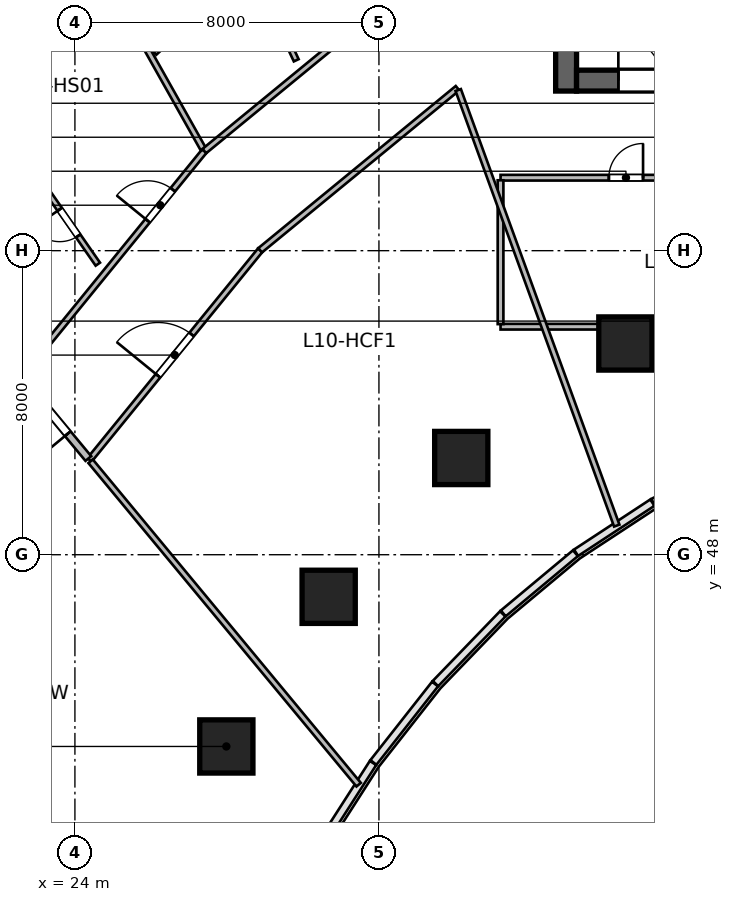
"""IFC4 building model, lengths in metres.
Left out: names, types, materials, properties, quantities, classifications, styles, units other than length and angle.
Written with IfcOpenShell. Run it as: python <this file> out.ifc"""

import sys

from ifc_helpers import new_model, si_unit, direction, frame, frame_2d, origin, origin_2d, place, context, subcontext, project, spatial, rectangle, circle, extrude, source, transform, mapped, element, fill, save


model = new_model("IFC4")
c1 = context("Model", 3, precision=1e-05, world=origin(), true_north=direction((0.0, 1.0)))
c2 = subcontext(c1, "Body", "Model", "MODEL_VIEW")
j1 = project(units=[si_unit("LENGTHUNIT", "METRE"), si_unit("PLANEANGLEUNIT", "RADIAN")], contexts=[c1])
p1 = place(None, origin())
s1 = spatial("IfcSite", under=j1, at=p1, CompositionType="ELEMENT")
p2 = place(p1, origin())
s2 = spatial("IfcBuilding", under=s1, at=p2, CompositionType="ELEMENT")
p3 = place(p2, frame((0.0, 0.0, 49.8)))
s3 = spatial("IfcBuildingStorey", under=s2, at=p3, CompositionType="ELEMENT", Elevation=49.8)
m1 = source(origin(), c2, "Body", "SweptSolid", [
    extrude(rectangle(XDim=12.0, YDim=0.55, at=frame_2d((6.0, 0.0))), origin(), (0.0, 0.0, 1.0), 3.6),
])
p4 = place(p3, frame((36.925, 60.2, 0.0), z_axis=(0.0, 0.0, 1.0), x_axis=(0.0, 1.0, 0.0)))
e1 = element("IfcWall", 1, at=p4, inside=s3, PredefinedType="SHEAR", context=c2, shape_type="MappedRepresentation", body=[
    mapped(m1, transform((0.0, 0.0, 0.0), scale=1.0)),
])
m2 = source(origin(), c2, "Body", "SweptSolid", [
    extrude(rectangle(XDim=21.6, YDim=0.55, at=frame_2d((10.8, 0.0))), origin(), (0.0, 0.0, 1.0), 3.6),
])
p5 = place(p3, frame((37.2, 60.475, 0.0), z_axis=(0.0, 0.0, 1.0), x_axis=(1.0, 0.0, 0.0)))
e2 = element("IfcWall", 2, at=p5, inside=s3, PredefinedType="SHEAR", context=c2, shape_type="MappedRepresentation", body=[
    mapped(m2, transform((0.0, 0.0, 0.0), scale=1.0)),
])
p6 = place(p5, frame((1.1, 0.0, 0.0)))
e3 = element("IfcOpeningElement", 3, at=p6, cuts=e2, PredefinedType="OPENING", context=c2, shape_type="SweptSolid", body=[
    extrude(rectangle(XDim=1.15, YDim=2.15, at=frame_2d((0.575, 1.075))), frame((0.0, 0.285, 0.0), z_axis=(0.0, -1.0, 0.0), x_axis=(1.0, 0.0, 0.0)), (0.0, 0.0, 1.0), 0.57),
])
p7 = place(p5, frame((19.5, 0.0, 0.0)))
e4 = element("IfcOpeningElement", 4, at=p7, cuts=e2, PredefinedType="OPENING", context=c2, shape_type="SweptSolid", body=[
    extrude(rectangle(XDim=0.9, YDim=2.1, at=frame_2d((0.45, 1.05))), frame((0.0, 0.285, 0.0), z_axis=(0.0, -1.0, 0.0), x_axis=(1.0, 0.0, 0.0)), (0.0, 0.0, 1.0), 0.57),
])
p8 = place(p5, frame((12.02, 0.0, 0.0)))
e5 = element("IfcOpeningElement", 5, at=p8, cuts=e2, PredefinedType="OPENING", context=c2, shape_type="SweptSolid", body=[
    extrude(rectangle(XDim=1.6, YDim=2.15, at=frame_2d((0.8, 1.075))), frame((0.0, 0.285, 0.0), z_axis=(0.0, -1.0, 0.0), x_axis=(1.0, 0.0, 0.0)), (0.0, 0.0, 1.0), 0.57),
])
m3 = source(origin(), c2, "Body", "SweptSolid", [
    extrude(circle(Radius=0.7, at=origin_2d()), origin(), (0.0, 0.0, 1.0), 3.6),
])
for number, where, z_axis, x_axis in (
    (6, (27.985, 42.955, 0.0), (0.0, 0.0, 1.0), (-0.691, 0.723, 0.0)),
    (7, (30.677, 46.892, 0.0), (0.0, 0.0, 1.0), (-0.571, 0.821, 0.0)),
    (8, (34.166, 50.545, 0.0), (0.0, 0.0, 1.0), (-0.436, 0.9, 0.0)),
    (9, (38.485, 53.558, 0.0), (0.0, 0.0, 1.0), (-0.289, 0.957, 0.0)),
):
    element("IfcColumn", number, at=place(p3, frame(where, z_axis=z_axis, x_axis=x_axis)), inside=s3, PredefinedType="COLUMN", context=c2, shape_type="MappedRepresentation", body=[
        mapped(m3, transform((0.0, 0.0, 0.0), scale=1.0)),
    ])
m4 = source(origin(), c2, "Body", "SweptSolid", [
    extrude(rectangle(XDim=6.6, YDim=0.15, at=frame_2d((3.3, 0.0))), origin(), (0.0, 0.0, 1.0), 2.803),
])
p9 = place(p3, frame((35.2, 54.0, 0.0), z_axis=(0.0, 0.0, 1.0), x_axis=(1.0, 0.0, 0.0)))
e10 = element("IfcWall", 10, at=p9, inside=s3, PredefinedType="PARTITIONING", context=c2, shape_type="MappedRepresentation", body=[
    mapped(m4, transform((0.0, 0.0, 0.0), scale=1.0)),
])
m5 = source(origin(), c2, "Body", "SweptSolid", [
    extrude(rectangle(XDim=6.6, YDim=0.15, at=frame_2d((3.3, 0.0))), origin(), (0.0, 0.0, 1.0), 3.36),
])
p10 = place(p3, frame((35.2, 57.92, 0.0), z_axis=(0.0, 0.0, 1.0), x_axis=(1.0, 0.0, 0.0)))
e11 = element("IfcWall", 11, at=p10, inside=s3, PredefinedType="PARTITIONING", context=c2, shape_type="MappedRepresentation", body=[
    mapped(m5, transform((0.0, 0.0, 0.0), scale=1.0)),
])
p11 = place(p10, frame((2.85, 0.0, 0.0)))
e12 = element("IfcOpeningElement", 12, at=p11, cuts=e11, PredefinedType="OPENING", context=c2, shape_type="SweptSolid", body=[
    extrude(rectangle(XDim=0.9, YDim=2.1, at=frame_2d((0.45, 1.05))), frame((0.0, 0.085, 0.0), z_axis=(0.0, -1.0, 0.0), x_axis=(1.0, 0.0, 0.0)), (0.0, 0.0, 1.0), 0.17),
])
m6 = source(origin(), c2, "Body", "SweptSolid", [
    extrude(rectangle(XDim=3.785, YDim=0.15, at=frame_2d((1.893, 0.0))), origin(), (0.0, 0.0, 1.0), 3.36),
])
p12 = place(p3, frame((35.2, 54.067, 0.0), z_axis=(0.0, 0.0, 1.0), x_axis=(0.0, 1.0, 0.0)))
e13 = element("IfcWall", 13, at=p12, inside=s3, PredefinedType="PARTITIONING", context=c2, shape_type="MappedRepresentation", body=[
    mapped(m6, transform((0.0, 0.0, 0.0), scale=1.0)),
])
m7 = source(origin(), c2, "Body", "SweptSolid", [
    extrude(rectangle(XDim=7.659, YDim=0.15, at=frame_2d((3.829, 0.0))), origin(), (0.0, 0.0, 1.0), 3.36),
])
p13 = place(p3, frame((22.57, 52.683, 0.0), z_axis=(0.0, 0.0, 1.0), x_axis=(0.631489868862, 0.775384127723, 0.0)))
e14 = element("IfcWall", 14, at=p13, inside=s3, PredefinedType="PARTITIONING", context=c2, shape_type="MappedRepresentation", body=[
    mapped(m7, transform((0.0, 0.0, 0.0), scale=1.0)),
])
p14 = place(p13, frame((5.295, 0.0, 0.0)))
e15 = element("IfcOpeningElement", 15, at=p14, cuts=e14, PredefinedType="OPENING", context=c2, shape_type="SweptSolid", body=[
    extrude(rectangle(XDim=1.05, YDim=2.15, at=frame_2d((0.525, 1.075))), frame((0.0, 0.085, 0.0), z_axis=(0.0, -1.0, 0.0), x_axis=(1.0, 0.0, 0.0)), (0.0, 0.0, 1.0), 0.17),
])
m8 = source(origin(), c2, "Body", "SweptSolid", [
    extrude(rectangle(XDim=11.573, YDim=0.15, at=frame_2d((5.786, 0.0))), origin(), (0.0, 0.0, 1.0), 3.36),
])
p15 = place(p3, frame((27.382, 58.664, 0.0), z_axis=(0.0, 0.0, 1.0), x_axis=(-0.490161073951, 0.871631872744, 0.0)))
e16 = element("IfcWall", 16, at=p15, inside=s3, PredefinedType="PARTITIONING", context=c2, shape_type="MappedRepresentation", body=[
    mapped(m8, transform((0.0, 0.0, 0.0), scale=1.0)),
])
m9 = source(origin(), c2, "Body", "SweptSolid", [
    extrude(rectangle(XDim=2.663, YDim=0.14, at=frame_2d((1.332, 0.0))), origin(), (0.0, 0.0, 1.0), 2.644),
])
p16 = place(p3, frame((24.603, 55.645, 0.0), z_axis=(0.0, 0.0, 1.0), x_axis=(-0.570905989724, 0.821015438891, 0.0)))
e17 = element("IfcWall", 17, at=p16, inside=s3, PredefinedType="PARTITIONING", context=c2, shape_type="MappedRepresentation", body=[
    mapped(m9, transform((0.0, 0.0, 0.0), scale=1.0)),
])
p17 = place(p16, frame((0.906, 0.0, 0.0)))
e18 = element("IfcOpeningElement", 18, at=p17, cuts=e17, PredefinedType="OPENING", context=c2, shape_type="SweptSolid", body=[
    extrude(rectangle(XDim=0.85, YDim=2.05, at=frame_2d((0.425, 1.025))), frame((0.0, 0.08, 0.0), z_axis=(0.0, -1.0, 0.0), x_axis=(1.0, 0.0, 0.0)), (0.0, 0.0, 1.0), 0.16),
])
m10 = source(origin(), c2, "Body", "SweptSolid", [
    extrude(rectangle(XDim=7.237, YDim=0.15, at=frame_2d((3.618, 0.0))), origin(), (0.0, 0.0, 1.0), 3.36),
])
p18 = place(p3, frame((27.406, 58.621, 0.0), z_axis=(0.0, 0.0, 1.0), x_axis=(0.772813707793, 0.634632943557, 0.0)))
e19 = element("IfcWall", 19, at=p18, inside=s3, PredefinedType="PARTITIONING", context=c2, shape_type="MappedRepresentation", body=[
    mapped(m10, transform((0.0, 0.0, 0.0), scale=1.0)),
])
p19 = place(p18, frame((4.975, 0.0, 0.0)))
e20 = element("IfcOpeningElement", 20, at=p19, cuts=e19, PredefinedType="OPENING", context=c2, shape_type="SweptSolid", body=[
    extrude(rectangle(XDim=1.05, YDim=2.15, at=frame_2d((0.525, 1.075))), frame((0.0, 0.085, 0.0), z_axis=(0.0, -1.0, 0.0), x_axis=(1.0, 0.0, 0.0)), (0.0, 0.0, 1.0), 0.17),
])
m11 = source(origin(), c2, "Body", "SweptSolid", [
    extrude(rectangle(XDim=3.456, YDim=0.14, at=frame_2d((1.728, 0.0))), origin(), (0.0, 0.0, 1.0), 3.36),
])
p20 = place(p3, frame((26.095, 61.207, 0.0), z_axis=(0.0, 0.0, 1.0), x_axis=(0.736860870293, 0.676044420013, 0.0)))
e21 = element("IfcWall", 21, at=p20, inside=s3, PredefinedType="PARTITIONING", context=c2, shape_type="MappedRepresentation", body=[
    mapped(m11, transform((0.0, 0.0, 0.0), scale=1.0)),
])
m12 = source(origin(), c2, "Body", "SweptSolid", [
    extrude(rectangle(XDim=2.796, YDim=0.14, at=frame_2d((1.398, 0.0))), origin(), (0.0, 0.0, 1.0), 3.36),
])
p21 = place(p3, frame((29.823, 61.009, 0.0), z_axis=(0.0, 0.0, 1.0), x_axis=(-0.422316594955, 0.906448395456, 0.0)))
e22 = element("IfcWall", 22, at=p21, inside=s3, PredefinedType="PARTITIONING", context=c2, shape_type="MappedRepresentation", body=[
    mapped(m12, transform((0.0, 0.0, 0.0), scale=1.0)),
])
p22 = place(p21, frame((0.973, 0.0, 0.0)))
e23 = element("IfcOpeningElement", 23, at=p22, cuts=e22, PredefinedType="OPENING", context=c2, shape_type="SweptSolid", body=[
    extrude(rectangle(XDim=0.85, YDim=2.05, at=frame_2d((0.425, 1.025))), frame((0.0, 0.08, 0.0), z_axis=(0.0, -1.0, 0.0), x_axis=(1.0, 0.0, 0.0)), (0.0, 0.0, 1.0), 0.16),
])
m13 = source(origin(), c2, "Body", "SweptSolid", [
    extrude(rectangle(XDim=7.113, YDim=0.15, at=frame_2d((3.556, 0.0))), origin(), (0.0, 0.0, 1.0), 3.36),
])
p23 = place(p3, frame((24.383, 50.495, 0.0), z_axis=(0.0, 0.0, 1.0), x_axis=(0.63149032532, 0.775383755974, 0.0)))
e24 = element("IfcWall", 24, at=p23, inside=s3, PredefinedType="PARTITIONING", context=c2, shape_type="MappedRepresentation", body=[
    mapped(m13, transform((0.0, 0.0, 0.0), scale=1.0)),
])
p24 = place(p23, frame((2.856, 0.0, 0.0)))
e25 = element("IfcOpeningElement", 25, at=p24, cuts=e24, PredefinedType="OPENING", context=c2, shape_type="SweptSolid", body=[
    extrude(rectangle(XDim=1.4, YDim=2.15, at=frame_2d((0.7, 1.075))), frame((0.0, 0.085, 0.0), z_axis=(0.0, -1.0, 0.0), x_axis=(1.0, 0.0, 0.0)), (0.0, 0.0, 1.0), 0.17),
])
m14 = source(origin(), c2, "Body", "SweptSolid", [
    extrude(rectangle(XDim=6.721, YDim=0.15, at=frame_2d((3.361, 0.0))), origin(), (0.0, 0.0, 1.0), 3.36),
])
p25 = place(p3, frame((28.874, 56.01, 0.0), z_axis=(0.0, 0.0, 1.0), x_axis=(0.772828051199, 0.63461547671, 0.0)))
e26 = element("IfcWall", 26, at=p25, inside=s3, PredefinedType="PARTITIONING", context=c2, shape_type="MappedRepresentation", body=[
    mapped(m14, transform((0.0, 0.0, 0.0), scale=1.0)),
])
m15 = source(origin(), c2, "Body", "SweptSolid", [
    extrude(rectangle(XDim=11.053, YDim=0.15, at=frame_2d((5.527, 0.0))), origin(), (0.0, 0.0, 1.0), 3.36),
])
p26 = place(p3, frame((31.466, 41.949, 0.0), z_axis=(0.0, 0.0, 1.0), x_axis=(-0.638131235571, 0.769927611005, 0.0)))
e27 = element("IfcWall", 27, at=p26, inside=s3, PredefinedType="PARTITIONING", context=c2, shape_type="MappedRepresentation", body=[
    mapped(m15, transform((0.0, 0.0, 0.0), scale=1.0)),
])
m16 = source(origin(), c2, "Body", "SweptSolid", [
    extrude(rectangle(XDim=12.196, YDim=0.15, at=frame_2d((6.098, 0.0))), origin(), (0.0, 0.0, 1.0), 3.36),
])
p27 = place(p3, frame((38.258, 48.766, 0.0), z_axis=(0.0, 0.0, 1.0), x_axis=(-0.342022711534, 0.939691686031, 0.0)))
e28 = element("IfcWall", 28, at=p27, inside=s3, PredefinedType="PARTITIONING", context=c2, shape_type="MappedRepresentation", body=[
    mapped(m16, transform((0.0, 0.0, 0.0), scale=1.0)),
])
m17 = source(origin(), c2, "Body", "SweptSolid", [
    extrude(rectangle(XDim=2.748, YDim=0.195, at=frame_2d((1.374, 0.0))), origin(), (0.0, 0.0, 1.0), 3.36),
])
p28 = place(p3, frame((24.353, 50.531, 0.0), z_axis=(0.0, 0.0, 1.0), x_axis=(-0.638111168284, 0.769944242729, 0.0)))
e29 = element("IfcWall", 29, at=p28, inside=s3, PredefinedType="PARTITIONING", context=c2, shape_type="MappedRepresentation", body=[
    mapped(m17, transform((0.0, 0.0, 0.0), scale=1.0)),
])
p29 = place(p28, frame((0.849, 0.0, 0.0)))
e30 = element("IfcOpeningElement", 30, at=p29, cuts=e29, PredefinedType="OPENING", context=c2, shape_type="SweptSolid", body=[
    extrude(rectangle(XDim=1.05, YDim=2.15, at=frame_2d((0.525, 1.075))), frame((0.0, 0.107, 0.0), z_axis=(0.0, -1.0, 0.0), x_axis=(1.0, 0.0, 0.0)), (0.0, 0.0, 1.0), 0.215),
])
m18 = source(origin(), c2, "Body", "SweptSolid", [
    extrude(rectangle(XDim=1.15, YDim=2.15, at=frame_2d((0.575, 1.075))), frame((0.0, 0.025, 0.0), z_axis=(0.0, -1.0, 0.0), x_axis=(1.0, 0.0, 0.0)), (0.0, 0.0, 1.0), 0.05),
])
p30 = place(p6, origin())
e31 = element("IfcDoor", 31, at=p30, inside=s3, OperationType="SINGLE_SWING_LEFT", PredefinedType="DOOR", context=c2, shape_type="MappedRepresentation", body=[
    mapped(m18, transform((0.0, 0.0, 0.0), scale=1.0)),
])
fill(e3, e31)
m19 = source(origin(), c2, "Body", "SweptSolid", [
    extrude(rectangle(XDim=0.9, YDim=2.1, at=frame_2d((0.45, 1.05))), frame((0.0, 0.025, 0.0), z_axis=(0.0, -1.0, 0.0), x_axis=(1.0, 0.0, 0.0)), (0.0, 0.0, 1.0), 0.05),
])
p31 = place(p11, origin())
e32 = element("IfcDoor", 32, at=p31, inside=s3, OperationType="SINGLE_SWING_RIGHT", PredefinedType="DOOR", context=c2, shape_type="MappedRepresentation", body=[
    mapped(m19, transform((0.0, 0.0, 0.0), scale=1.0)),
])
fill(e12, e32)
m20 = source(origin(), c2, "Body", "SweptSolid", [
    extrude(rectangle(XDim=1.05, YDim=2.15, at=frame_2d((0.525, 1.075))), frame((0.0, 0.025, 0.0), z_axis=(0.0, -1.0, 0.0), x_axis=(1.0, 0.0, 0.0)), (0.0, 0.0, 1.0), 0.05),
])
p32 = place(p14, origin())
e33 = element("IfcDoor", 33, at=p32, inside=s3, OperationType="SINGLE_SWING_LEFT", PredefinedType="DOOR", context=c2, shape_type="MappedRepresentation", body=[
    mapped(m20, transform((0.0, 0.0, 0.0), scale=1.0)),
])
fill(e15, e33)
m21 = source(origin(), c2, "Body", "SweptSolid", [
    extrude(rectangle(XDim=0.85, YDim=2.05, at=frame_2d((0.425, 1.025))), frame((0.0, 0.025, 0.0), z_axis=(0.0, -1.0, 0.0), x_axis=(1.0, 0.0, 0.0)), (0.0, 0.0, 1.0), 0.05),
])
p33 = place(p17, origin())
e34 = element("IfcDoor", 34, at=p33, inside=s3, OperationType="SINGLE_SWING_RIGHT", PredefinedType="DOOR", context=c2, shape_type="MappedRepresentation", body=[
    mapped(m21, transform((0.0, 0.0, 0.0), scale=1.0)),
])
fill(e18, e34)
m22 = source(origin(), c2, "Body", "SweptSolid", [
    extrude(rectangle(XDim=1.4, YDim=2.15, at=frame_2d((0.7, 1.075))), frame((0.0, 0.025, 0.0), z_axis=(0.0, -1.0, 0.0), x_axis=(1.0, 0.0, 0.0)), (0.0, 0.0, 1.0), 0.05),
])
p34 = place(p24, origin())
e35 = element("IfcDoor", 35, at=p34, inside=s3, OperationType="SINGLE_SWING_LEFT", PredefinedType="DOOR", context=c2, shape_type="MappedRepresentation", body=[
    mapped(m22, transform((0.0, 0.0, 0.0), scale=1.0)),
])
fill(e25, e35)
p35 = place(p29, origin())
e36 = element("IfcDoor", 36, at=p35, inside=s3, OperationType="SINGLE_SWING_LEFT", PredefinedType="DOOR", context=c2, shape_type="MappedRepresentation", body=[
    mapped(m20, transform((0.0, 0.0, 0.0), scale=1.0)),
])
fill(e30, e36)
save(model, sys.argv[1])
